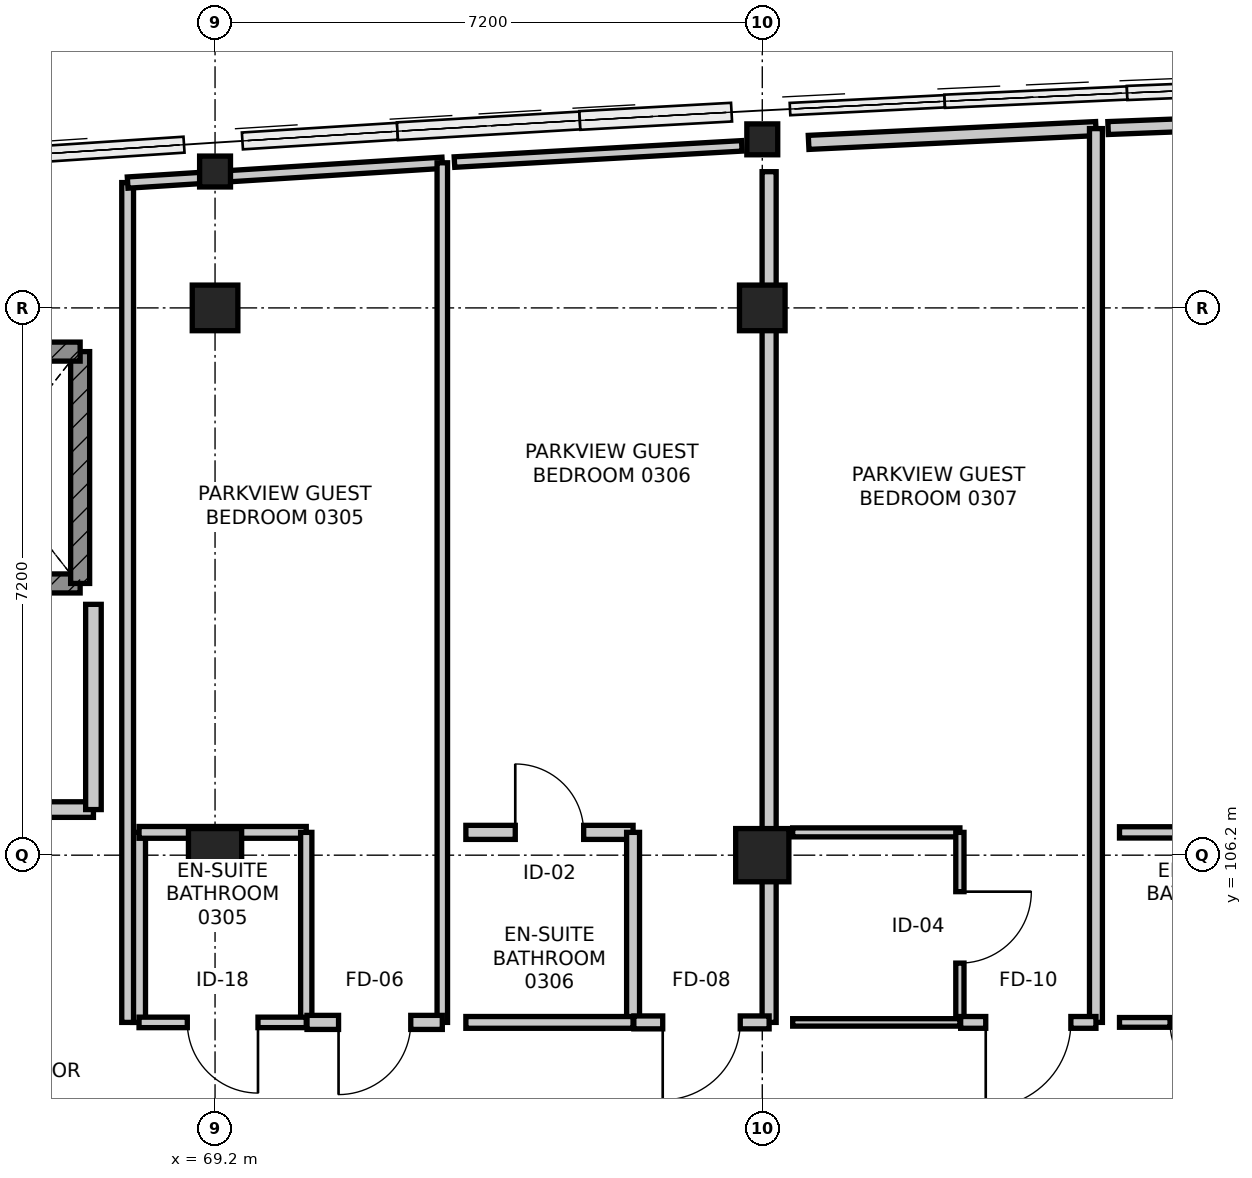
"""IFC4 building model, lengths in metres.
Left out: names, types, materials, properties, quantities, classifications, styles, units other than length and angle.
Written with IfcOpenShell. Run it as: python <this file> out.ifc"""

import sys

from ifc_helpers import new_model, si_unit, direction, frame, frame_2d, origin, origin_2d, place, context, subcontext, project, spatial, rectangle, hollow_circle, extrude, element, fill, save


model = new_model("IFC4")
c1 = context("Model", 3, precision=1e-05, world=origin(), true_north=direction((0.0, 1.0)))
c2 = subcontext(c1, "Body", "Model", "MODEL_VIEW")
j1 = project(units=[si_unit("LENGTHUNIT", "METRE"), si_unit("PLANEANGLEUNIT", "RADIAN")], contexts=[c1])
p1 = place(None, origin())
s1 = spatial("IfcSite", under=j1, at=p1, CompositionType="ELEMENT")
p2 = place(p1, origin())
s2 = spatial("IfcBuilding", under=s1, at=p2, CompositionType="ELEMENT")
p3 = place(p2, frame((0.0, 0.0, 15.0)))
s3 = spatial("IfcBuildingStorey", under=s2, at=p3, CompositionType="ELEMENT", Elevation=15.0)
p4 = place(p3, frame((69.2, 106.2, 0.0), z_axis=(0.0, 0.0, 1.0), x_axis=(1.0, 0.0, 0.0)))
e1 = element("IfcColumn", 1, at=p4, inside=s3, PredefinedType="COLUMN", context=c2, shape_type="SweptSolid", body=[
    extrude(rectangle(XDim=0.7, YDim=0.7, at=origin_2d()), origin(), (0.0, 0.0, 1.0), 4.2),
])
p5 = place(p3, frame((69.2, 113.4, 0.0), z_axis=(0.0, 0.0, 1.0), x_axis=(1.0, 0.0, 0.0)))
e2 = element("IfcColumn", 2, at=p5, inside=s3, PredefinedType="COLUMN", context=c2, shape_type="SweptSolid", body=[
    extrude(rectangle(XDim=0.6, YDim=0.6, at=origin_2d()), origin(), (0.0, 0.0, 1.0), 4.2),
])
p6 = place(p3, frame((69.2, 115.194, 0.0), z_axis=(0.0, 0.0, 1.0), x_axis=(1.0, 0.0, 0.0)))
e3 = element("IfcColumn", 3, at=p6, inside=s3, PredefinedType="COLUMN", context=c2, shape_type="SweptSolid", body=[
    extrude(hollow_circle(Radius=0.203, WallThickness=0.02, at=origin_2d()), origin(), (0.0, 0.0, 1.0), 4.2),
])
p7 = place(p3, frame((76.4, 106.2, 0.0), z_axis=(0.0, 0.0, 1.0), x_axis=(1.0, 0.0, 0.0)))
e4 = element("IfcColumn", 4, at=p7, inside=s3, PredefinedType="COLUMN", context=c2, shape_type="SweptSolid", body=[
    extrude(rectangle(XDim=0.7, YDim=0.7, at=origin_2d()), origin(), (0.0, 0.0, 1.0), 4.2),
])
p8 = place(p3, frame((76.4, 113.4, 0.0), z_axis=(0.0, 0.0, 1.0), x_axis=(1.0, 0.0, 0.0)))
e5 = element("IfcColumn", 5, at=p8, inside=s3, PredefinedType="COLUMN", context=c2, shape_type="SweptSolid", body=[
    extrude(rectangle(XDim=0.6, YDim=0.6, at=origin_2d()), origin(), (0.0, 0.0, 1.0), 4.2),
])
p9 = place(p3, frame((76.4, 115.618, 0.0), z_axis=(0.0, 0.0, 1.0), x_axis=(1.0, 0.0, 0.0)))
e6 = element("IfcColumn", 6, at=p9, inside=s3, PredefinedType="COLUMN", context=c2, shape_type="SweptSolid", body=[
    extrude(hollow_circle(Radius=0.203, WallThickness=0.02, at=origin_2d()), origin(), (0.0, 0.0, 1.0), 4.2),
])
p10 = place(p3, frame((64.975, 109.775, 0.0), z_axis=(0.0, 0.0, 1.0), x_axis=(1.0, 0.0, 0.0)))
e7 = element("IfcWall", 7, at=p10, inside=s3, PredefinedType="SHEAR", context=c2, shape_type="SweptSolid", body=[
    extrude(rectangle(XDim=2.45, YDim=0.25, at=frame_2d((1.225, 0.0))), origin(), (0.0, 0.0, 1.0), 3.94),
])
p11 = place(p10, frame((0.725, 0.0, 0.0)))
e8 = element("IfcOpeningElement", 8, at=p11, cuts=e7, PredefinedType="OPENING", context=c2, shape_type="SweptSolid", body=[
    extrude(rectangle(XDim=1.0, YDim=2.15, at=frame_2d((0.5, 1.075))), frame((0.0, 0.135, 0.0), z_axis=(0.0, -1.0, 0.0), x_axis=(1.0, 0.0, 0.0)), (0.0, 0.0, 1.0), 0.27),
])
p12 = place(p3, frame((67.425, 109.775, 0.0), z_axis=(0.0, 0.0, 1.0), x_axis=(0.0, 1.0, 0.0)))
e9 = element("IfcWall", 9, at=p12, inside=s3, PredefinedType="SHEAR", context=c2, shape_type="SweptSolid", body=[
    extrude(rectangle(XDim=3.05, YDim=0.25, at=frame_2d((1.525, 0.0))), origin(), (0.0, 0.0, 1.0), 3.94),
])
p13 = place(p3, frame((67.425, 112.825, 0.0), z_axis=(0.0, 0.0, 1.0), x_axis=(-1.0, 0.0, 0.0)))
e10 = element("IfcWall", 10, at=p13, inside=s3, PredefinedType="SHEAR", context=c2, shape_type="SweptSolid", body=[
    extrude(rectangle(XDim=2.45, YDim=0.25, at=frame_2d((1.225, 0.0))), origin(), (0.0, 0.0, 1.0), 3.94),
])
p14 = place(p3, frame((62.6, 106.8, 0.0), z_axis=(0.0, 0.0, 1.0), x_axis=(1.0, 0.0, 0.0)))
e11 = element("IfcWall", 11, at=p14, inside=s3, PredefinedType="PARTITIONING", context=c2, shape_type="SweptSolid", body=[
    extrude(rectangle(XDim=5.0, YDim=0.205, at=frame_2d((2.5, 0.0))), origin(), (0.0, 0.0, 1.0), 3.94),
])
p15 = place(p14, frame((1.9, 0.0, 0.0)))
e12 = element("IfcOpeningElement", 12, at=p15, cuts=e11, PredefinedType="OPENING", context=c2, shape_type="SweptSolid", body=[
    extrude(rectangle(XDim=1.2, YDim=2.1, at=frame_2d((0.6, 1.05))), frame((0.0, 0.113, 0.0), z_axis=(0.0, -1.0, 0.0), x_axis=(1.0, 0.0, 0.0)), (0.0, 0.0, 1.0), 0.225),
])
p16 = place(p3, frame((67.6, 106.8, 0.0), z_axis=(0.0, 0.0, 1.0), x_axis=(0.0, 1.0, 0.0)))
e13 = element("IfcWall", 13, at=p16, inside=s3, PredefinedType="PARTITIONING", context=c2, shape_type="SweptSolid", body=[
    extrude(rectangle(XDim=2.7, YDim=0.205, at=frame_2d((1.35, 0.0))), origin(), (0.0, 0.0, 1.0), 3.94),
])
p17 = place(p3, frame((68.2, 104.0, 0.0), z_axis=(0.0, 0.0, 1.0), x_axis=(0.0, 1.0, 0.0)))
e14 = element("IfcWall", 14, at=p17, inside=s3, PredefinedType="PARTITIONING", context=c2, shape_type="SweptSolid", body=[
    extrude(rectangle(XDim=2.5, YDim=0.17, at=frame_2d((1.25, 0.0))), origin(), (0.0, 0.0, 1.0), 3.325),
])
p18 = place(p3, frame((68.2, 106.5, 0.0), z_axis=(0.0, 0.0, 1.0), x_axis=(1.0, 0.0, 0.0)))
e15 = element("IfcWall", 15, at=p18, inside=s3, PredefinedType="PARTITIONING", context=c2, shape_type="SweptSolid", body=[
    extrude(rectangle(XDim=2.2, YDim=0.155, at=frame_2d((1.1, 0.0))), origin(), (0.0, 0.0, 1.0), 3.275),
])
p19 = place(p3, frame((70.4, 106.5, 0.0), z_axis=(0.0, 0.0, 1.0), x_axis=(0.0, -1.0, 0.0)))
e16 = element("IfcWall", 16, at=p19, inside=s3, PredefinedType="PARTITIONING", context=c2, shape_type="SweptSolid", body=[
    extrude(rectangle(XDim=2.5, YDim=0.148, at=frame_2d((1.25, 0.0))), origin(), (0.0, 0.0, 1.0), 3.325),
])
p20 = place(p3, frame((70.4, 104.0, 0.0), z_axis=(0.0, 0.0, 1.0), x_axis=(-1.0, 0.0, 0.0)))
e17 = element("IfcWall", 17, at=p20, inside=s3, PredefinedType="PARTITIONING", context=c2, shape_type="SweptSolid", body=[
    extrude(rectangle(XDim=2.2, YDim=0.138, at=frame_2d((1.1, 0.0))), origin(), (0.0, 0.0, 1.0), 3.275),
])
p21 = place(p20, frame((0.635, 0.0, 0.0)))
e18 = element("IfcOpeningElement", 18, at=p21, cuts=e17, PredefinedType="OPENING", context=c2, shape_type="SweptSolid", body=[
    extrude(rectangle(XDim=0.93, YDim=2.13, at=frame_2d((0.465, 1.065))), frame((0.0, 0.079, 0.0), z_axis=(0.0, -1.0, 0.0), x_axis=(1.0, 0.0, 0.0)), (0.0, 0.0, 1.0), 0.158),
])
p22 = place(p3, frame((68.05, 104.0, 0.0), z_axis=(0.0, 0.0, 1.0), x_axis=(0.0, 1.0, 0.0)))
e19 = element("IfcWall", 19, at=p22, inside=s3, PredefinedType="PARTITIONING", context=c2, shape_type="SweptSolid", body=[
    extrude(rectangle(XDim=11.049, YDim=0.155, at=frame_2d((5.524, 0.0))), origin(), (0.0, 0.0, 1.0), 3.325),
])
p23 = place(p3, frame((68.05, 115.049, 0.0), z_axis=(0.0, 0.0, 1.0), x_axis=(0.998029840206, 0.062741039669, 0.0)))
e20 = element("IfcWall", 20, at=p23, inside=s3, PredefinedType="PARTITIONING", context=c2, shape_type="SweptSolid", body=[
    extrude(rectangle(XDim=4.148, YDim=0.148, at=frame_2d((2.074, 0.0))), origin(), (0.0, 0.0, 1.0), 3.516),
])
p24 = place(p3, frame((72.19, 115.309, 0.0), z_axis=(0.0, 0.0, 1.0), x_axis=(0.0, -1.0, 0.0)))
e21 = element("IfcWall", 21, at=p24, inside=s3, PredefinedType="PARTITIONING", context=c2, shape_type="SweptSolid", body=[
    extrude(rectangle(XDim=11.309, YDim=0.138, at=frame_2d((5.655, 0.0))), origin(), (0.0, 0.0, 1.0), 3.325),
])
p25 = place(p3, frame((72.19, 104.0, 0.0), z_axis=(0.0, 0.0, 1.0), x_axis=(-1.0, 0.0, 0.0)))
e22 = element("IfcWall", 22, at=p25, inside=s3, PredefinedType="PARTITIONING", context=c2, shape_type="SweptSolid", body=[
    extrude(rectangle(XDim=1.78, YDim=0.185, at=frame_2d((0.89, 0.0))), origin(), (0.0, 0.0, 1.0), 3.94),
])
p26 = place(p25, frame((0.415, 0.0, 0.0)))
e23 = element("IfcOpeningElement", 23, at=p26, cuts=e22, PredefinedType="OPENING", context=c2, shape_type="SweptSolid", body=[
    extrude(rectangle(XDim=0.95, YDim=2.1, at=frame_2d((0.475, 1.05))), frame((0.0, 0.103, 0.0), z_axis=(0.0, -1.0, 0.0), x_axis=(1.0, 0.0, 0.0)), (0.0, 0.0, 1.0), 0.205),
])
p27 = place(p3, frame((72.5, 106.5, 0.0), z_axis=(0.0, 0.0, 1.0), x_axis=(1.0, 0.0, 0.0)))
e24 = element("IfcWall", 24, at=p27, inside=s3, PredefinedType="PARTITIONING", context=c2, shape_type="SweptSolid", body=[
    extrude(rectangle(XDim=2.2, YDim=0.185, at=frame_2d((1.1, 0.0))), origin(), (0.0, 0.0, 1.0), 3.325),
])
p28 = place(p27, frame((0.65, 0.0, 0.0)))
e25 = element("IfcOpeningElement", 25, at=p28, cuts=e24, PredefinedType="OPENING", context=c2, shape_type="SweptSolid", body=[
    extrude(rectangle(XDim=0.9, YDim=2.08, at=frame_2d((0.45, 1.04))), frame((0.0, 0.103, 0.0), z_axis=(0.0, -1.0, 0.0), x_axis=(1.0, 0.0, 0.0)), (0.0, 0.0, 1.0), 0.205),
])
p29 = place(p3, frame((74.7, 106.5, 0.0), z_axis=(0.0, 0.0, 1.0), x_axis=(0.0, -1.0, 0.0)))
e26 = element("IfcWall", 26, at=p29, inside=s3, PredefinedType="PARTITIONING", context=c2, shape_type="SweptSolid", body=[
    extrude(rectangle(XDim=2.5, YDim=0.17, at=frame_2d((1.25, 0.0))), origin(), (0.0, 0.0, 1.0), 3.325),
])
p30 = place(p3, frame((74.7, 104.0, 0.0), z_axis=(0.0, 0.0, 1.0), x_axis=(-1.0, 0.0, 0.0)))
e27 = element("IfcWall", 27, at=p30, inside=s3, PredefinedType="PARTITIONING", context=c2, shape_type="SweptSolid", body=[
    extrude(rectangle(XDim=2.2, YDim=0.155, at=frame_2d((1.1, 0.0))), origin(), (0.0, 0.0, 1.0), 3.94),
])
p31 = place(p3, frame((72.35, 115.319, 0.0), z_axis=(0.0, 0.0, 1.0), x_axis=(0.998414587375, 0.056287758139, 0.0)))
e28 = element("IfcWall", 28, at=p31, inside=s3, PredefinedType="PARTITIONING", context=c2, shape_type="SweptSolid", body=[
    extrude(rectangle(XDim=3.787, YDim=0.138, at=frame_2d((1.893, 0.0))), origin(), (0.0, 0.0, 1.0), 3.516),
])
p32 = place(p3, frame((76.49, 115.192, 0.0), z_axis=(0.0, 0.0, 1.0), x_axis=(0.0, -1.0, 0.0)))
e29 = element("IfcWall", 29, at=p32, inside=s3, PredefinedType="PARTITIONING", context=c2, shape_type="SweptSolid", body=[
    extrude(rectangle(XDim=11.192, YDim=0.185, at=frame_2d((5.596, 0.0))), origin(), (0.0, 0.0, 1.0), 3.275),
])
p33 = place(p3, frame((76.49, 104.0, 0.0), z_axis=(0.0, 0.0, 1.0), x_axis=(-1.0, 0.0, 0.0)))
e30 = element("IfcWall", 30, at=p33, inside=s3, PredefinedType="PARTITIONING", context=c2, shape_type="SweptSolid", body=[
    extrude(rectangle(XDim=1.78, YDim=0.17, at=frame_2d((0.89, 0.0))), origin(), (0.0, 0.0, 1.0), 3.275),
])
p34 = place(p33, frame((0.38, 0.0, 0.0)))
e31 = element("IfcOpeningElement", 31, at=p34, cuts=e30, PredefinedType="OPENING", context=c2, shape_type="SweptSolid", body=[
    extrude(rectangle(XDim=1.02, YDim=2.15, at=frame_2d((0.51, 1.075))), frame((0.0, 0.095, 0.0), z_axis=(0.0, -1.0, 0.0), x_axis=(1.0, 0.0, 0.0)), (0.0, 0.0, 1.0), 0.19),
])
p35 = place(p3, frame((76.8, 106.5, 0.0), z_axis=(0.0, 0.0, 1.0), x_axis=(1.0, 0.0, 0.0)))
e32 = element("IfcWall", 32, at=p35, inside=s3, PredefinedType="PARTITIONING", context=c2, shape_type="SweptSolid", body=[
    extrude(rectangle(XDim=2.2, YDim=0.118, at=frame_2d((1.1, 0.0))), origin(), (0.0, 0.0, 1.0), 3.94),
])
p36 = place(p3, frame((79.0, 106.5, 0.0), z_axis=(0.0, 0.0, 1.0), x_axis=(0.0, -1.0, 0.0)))
e33 = element("IfcWall", 33, at=p36, inside=s3, PredefinedType="PARTITIONING", context=c2, shape_type="SweptSolid", body=[
    extrude(rectangle(XDim=2.5, YDim=0.108, at=frame_2d((1.25, 0.0))), origin(), (0.0, 0.0, 1.0), 3.325),
])
p37 = place(p36, frame((0.78, 0.0, 0.0)))
e34 = element("IfcOpeningElement", 34, at=p37, cuts=e33, PredefinedType="OPENING", context=c2, shape_type="SweptSolid", body=[
    extrude(rectangle(XDim=0.94, YDim=2.12, at=frame_2d((0.47, 1.06))), frame((0.0, 0.064, 0.0), z_axis=(0.0, -1.0, 0.0), x_axis=(1.0, 0.0, 0.0)), (0.0, 0.0, 1.0), 0.128),
])
p38 = place(p3, frame((79.0, 104.0, 0.0), z_axis=(0.0, 0.0, 1.0), x_axis=(-1.0, 0.0, 0.0)))
e35 = element("IfcWall", 35, at=p38, inside=s3, PredefinedType="PARTITIONING", context=c2, shape_type="SweptSolid", body=[
    extrude(rectangle(XDim=2.2, YDim=0.098, at=frame_2d((1.1, 0.0))), origin(), (0.0, 0.0, 1.0), 3.94),
])
p39 = place(p3, frame((77.01, 115.577, 0.0), z_axis=(0.0, 0.0, 1.0), x_axis=(0.998847761626, 0.047991135592, 0.0)))
e36 = element("IfcWall", 36, at=p39, inside=s3, PredefinedType="PARTITIONING", context=c2, shape_type="SweptSolid", body=[
    extrude(rectangle(XDim=3.785, YDim=0.185, at=frame_2d((1.893, 0.0))), origin(), (0.0, 0.0, 1.0), 3.516),
])
p40 = place(p3, frame((80.79, 115.759, 0.0), z_axis=(0.0, 0.0, 1.0), x_axis=(0.0, -1.0, 0.0)))
e37 = element("IfcWall", 37, at=p40, inside=s3, PredefinedType="PARTITIONING", context=c2, shape_type="SweptSolid", body=[
    extrude(rectangle(XDim=11.759, YDim=0.17, at=frame_2d((5.879, 0.0))), origin(), (0.0, 0.0, 1.0), 3.325),
])
p41 = place(p3, frame((80.79, 104.0, 0.0), z_axis=(0.0, 0.0, 1.0), x_axis=(-1.0, 0.0, 0.0)))
e38 = element("IfcWall", 38, at=p41, inside=s3, PredefinedType="PARTITIONING", context=c2, shape_type="SweptSolid", body=[
    extrude(rectangle(XDim=1.78, YDim=0.155, at=frame_2d((0.89, 0.0))), origin(), (0.0, 0.0, 1.0), 3.94),
])
p42 = place(p41, frame((0.33, 0.0, 0.0)))
e39 = element("IfcOpeningElement", 39, at=p42, cuts=e38, PredefinedType="OPENING", context=c2, shape_type="SweptSolid", body=[
    extrude(rectangle(XDim=1.12, YDim=2.2, at=frame_2d((0.56, 1.1))), frame((0.0, 0.087, 0.0), z_axis=(0.0, -1.0, 0.0), x_axis=(1.0, 0.0, 0.0)), (0.0, 0.0, 1.0), 0.175),
])
p43 = place(p3, frame((81.1, 106.5, 0.0), z_axis=(0.0, 0.0, 1.0), x_axis=(1.0, 0.0, 0.0)))
e40 = element("IfcWall", 40, at=p43, inside=s3, PredefinedType="PARTITIONING", context=c2, shape_type="SweptSolid", body=[
    extrude(rectangle(XDim=1.79, YDim=0.148, at=frame_2d((0.895, 0.0))), origin(), (0.0, 0.0, 1.0), 3.94),
])
p44 = place(p3, frame((83.3, 104.0, 0.0), z_axis=(0.0, 0.0, 1.0), x_axis=(-1.0, 0.0, 0.0)))
e41 = element("IfcWall", 41, at=p44, inside=s3, PredefinedType="PARTITIONING", context=c2, shape_type="SweptSolid", body=[
    extrude(rectangle(XDim=2.2, YDim=0.128, at=frame_2d((1.1, 0.0))), origin(), (0.0, 0.0, 1.0), 3.94),
])
p45 = place(p44, frame((0.665, 0.0, 0.0)))
e42 = element("IfcOpeningElement", 42, at=p45, cuts=e41, PredefinedType="OPENING", context=c2, shape_type="SweptSolid", body=[
    extrude(rectangle(XDim=0.87, YDim=2.07, at=frame_2d((0.435, 1.035))), frame((0.0, 0.074, 0.0), z_axis=(0.0, -1.0, 0.0), x_axis=(1.0, 0.0, 0.0)), (0.0, 0.0, 1.0), 0.148),
])
p46 = place(p3, frame((80.95, 115.766, 0.0), z_axis=(0.0, 0.0, 1.0), x_axis=(0.999261696776, 0.03841954395, 0.0)))
e43 = element("IfcWall", 43, at=p46, inside=s3, PredefinedType="PARTITIONING", context=c2, shape_type="SweptSolid", body=[
    extrude(rectangle(XDim=4.143, YDim=0.17, at=frame_2d((2.072, 0.0))), origin(), (0.0, 0.0, 1.0), 3.516),
])
p47 = place(p21, origin())
e44 = element("IfcDoor", 44, at=p47, inside=s3, OperationType="SINGLE_SWING_LEFT", PredefinedType="DOOR", context=c2, shape_type="SweptSolid", body=[
    extrude(rectangle(XDim=0.93, YDim=2.13, at=frame_2d((0.465, 1.065))), frame((0.0, 0.025, 0.0), z_axis=(0.0, -1.0, 0.0), x_axis=(1.0, 0.0, 0.0)), (0.0, 0.0, 1.0), 0.05),
])
fill(e18, e44)
p48 = place(p26, origin())
e45 = element("IfcDoor", 45, at=p48, inside=s3, OperationType="SINGLE_SWING_RIGHT", PredefinedType="DOOR", context=c2, shape_type="SweptSolid", body=[
    extrude(rectangle(XDim=0.95, YDim=2.1, at=frame_2d((0.475, 1.05))), frame((0.0, 0.025, 0.0), z_axis=(0.0, -1.0, 0.0), x_axis=(1.0, 0.0, 0.0)), (0.0, 0.0, 1.0), 0.05),
])
fill(e23, e45)
p49 = place(p28, origin())
e46 = element("IfcDoor", 46, at=p49, inside=s3, OperationType="SINGLE_SWING_LEFT", PredefinedType="DOOR", context=c2, shape_type="SweptSolid", body=[
    extrude(rectangle(XDim=0.9, YDim=2.08, at=frame_2d((0.45, 1.04))), frame((0.0, 0.025, 0.0), z_axis=(0.0, -1.0, 0.0), x_axis=(1.0, 0.0, 0.0)), (0.0, 0.0, 1.0), 0.05),
])
fill(e25, e46)
p50 = place(p34, origin())
e47 = element("IfcDoor", 47, at=p50, inside=s3, OperationType="SINGLE_SWING_RIGHT", PredefinedType="DOOR", context=c2, shape_type="SweptSolid", body=[
    extrude(rectangle(XDim=1.02, YDim=2.15, at=frame_2d((0.51, 1.075))), frame((0.0, 0.025, 0.0), z_axis=(0.0, -1.0, 0.0), x_axis=(1.0, 0.0, 0.0)), (0.0, 0.0, 1.0), 0.05),
])
fill(e31, e47)
p51 = place(p37, origin())
e48 = element("IfcDoor", 48, at=p51, inside=s3, OperationType="SINGLE_SWING_LEFT", PredefinedType="DOOR", context=c2, shape_type="SweptSolid", body=[
    extrude(rectangle(XDim=0.94, YDim=2.12, at=frame_2d((0.47, 1.06))), frame((0.0, 0.025, 0.0), z_axis=(0.0, -1.0, 0.0), x_axis=(1.0, 0.0, 0.0)), (0.0, 0.0, 1.0), 0.05),
])
fill(e34, e48)
p52 = place(p42, origin())
e49 = element("IfcDoor", 49, at=p52, inside=s3, OperationType="SINGLE_SWING_RIGHT", PredefinedType="DOOR", context=c2, shape_type="SweptSolid", body=[
    extrude(rectangle(XDim=1.12, YDim=2.2, at=frame_2d((0.56, 1.1))), frame((0.0, 0.025, 0.0), z_axis=(0.0, -1.0, 0.0), x_axis=(1.0, 0.0, 0.0)), (0.0, 0.0, 1.0), 0.05),
])
fill(e39, e49)
p53 = place(p45, origin())
e50 = element("IfcDoor", 50, at=p53, inside=s3, OperationType="SINGLE_SWING_LEFT", PredefinedType="DOOR", context=c2, shape_type="SweptSolid", body=[
    extrude(rectangle(XDim=0.87, YDim=2.07, at=frame_2d((0.435, 1.035))), frame((0.0, 0.025, 0.0), z_axis=(0.0, -1.0, 0.0), x_axis=(1.0, 0.0, 0.0)), (0.0, 0.0, 1.0), 0.05),
])
fill(e42, e50)
save(model, sys.argv[1])
